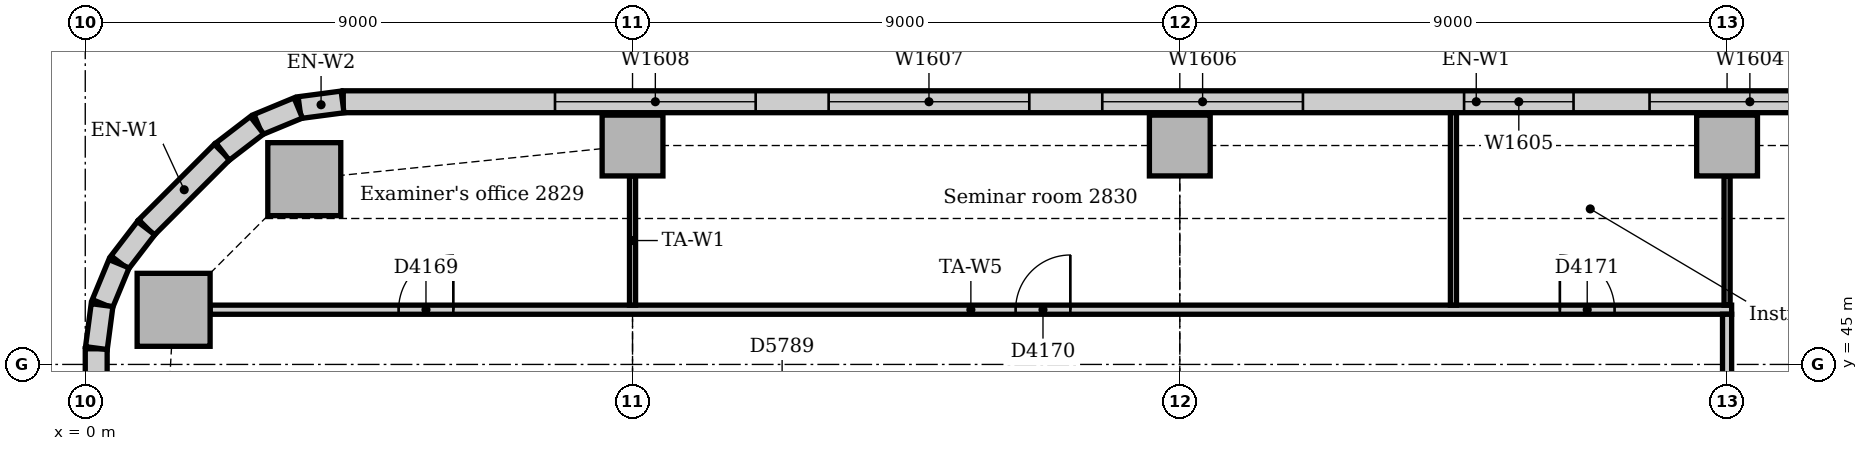
"""IFC4 building model, lengths in metres.
Left out: names, types, materials, properties, quantities, classifications, styles, units other than length and angle.
Written with IfcOpenShell. Run it as: python <this file> out.ifc"""

import sys

from ifc_helpers import new_model, si_unit, direction, frame, frame_2d, origin, origin_2d, place, context, subcontext, project, spatial, rectangle, extrude, element, fill, save


model = new_model("IFC4")
c1 = context("Model", 3, precision=1e-05, world=origin(), true_north=direction((0.0, 1.0)))
c2 = subcontext(c1, "Body", "Model", "MODEL_VIEW")
j1 = project(units=[si_unit("LENGTHUNIT", "METRE"), si_unit("PLANEANGLEUNIT", "RADIAN")], contexts=[c1])
p1 = place(None, origin())
s1 = spatial("IfcSite", under=j1, at=p1, CompositionType="ELEMENT")
p2 = place(p1, origin())
s2 = spatial("IfcBuilding", under=s1, at=p2, CompositionType="ELEMENT")
p3 = place(p2, frame((0.0, 0.0, 120.0)))
s3 = spatial("IfcBuildingStorey", under=s2, at=p3, CompositionType="ELEMENT", Elevation=120.0)
for number, where, z_axis, x_axis in (
    (1, (3.602, 48.047, 0.0), (0.0, 0.0, 1.0), (1.0, 0.0, 0.0)),
    (2, (1.453, 45.898, 0.0), (0.0, 0.0, 1.0), (1.0, 0.0, 0.0)),
):
    element("IfcColumn", number, at=place(p3, frame(where, z_axis=z_axis, x_axis=x_axis)), inside=s3, PredefinedType="COLUMN", context=c2, shape_type="SweptSolid", body=[
        extrude(rectangle(XDim=1.2, YDim=1.2, at=origin_2d()), origin(), (0.0, 0.0, 1.0), 3.85),
    ])
for number, where, z_axis, x_axis in (
    (3, (9.0, 48.6, 0.0), (0.0, 0.0, 1.0), (1.0, 0.0, 0.0)),
    (4, (18.0, 48.6, 0.0), (0.0, 0.0, 1.0), (1.0, 0.0, 0.0)),
    (5, (27.0, 48.6, 0.0), (0.0, 0.0, 1.0), (1.0, 0.0, 0.0)),
):
    element("IfcColumn", number, at=place(p3, frame(where, z_axis=z_axis, x_axis=x_axis)), inside=s3, PredefinedType="COLUMN", context=c2, shape_type="SweptSolid", body=[
        extrude(rectangle(XDim=1.0, YDim=1.0, at=origin_2d()), origin(), (0.0, 0.0, 1.0), 3.85),
    ])
p4 = place(p3, frame((41.507, 49.32, 0.0), z_axis=(0.0, 0.0, 1.0), x_axis=(-1.0, 0.0, 0.0)))
e6 = element("IfcWall", 6, at=p4, inside=s3, PredefinedType="STANDARD", context=c2, shape_type="SweptSolid", body=[
    extrude(rectangle(XDim=37.265, YDim=0.36, at=frame_2d((18.632, 0.0))), origin(), (0.0, 0.0, 1.0), 3.85),
])
p5 = place(p4, frame((3.482, 0.0, 0.9)))
e7 = element("IfcOpeningElement", 7, at=p5, cuts=e6, PredefinedType="OPENING", context=c2, shape_type="SweptSolid", body=[
    extrude(rectangle(XDim=3.3, YDim=1.6, at=frame_2d((1.65, 0.8))), frame((0.0, 0.19, 0.0), z_axis=(0.0, -1.0, 0.0), x_axis=(1.0, 0.0, 0.0)), (0.0, 0.0, 1.0), 0.38),
])
p6 = place(p4, frame((7.982, 0.0, 0.9)))
e8 = element("IfcOpeningElement", 8, at=p6, cuts=e6, PredefinedType="OPENING", context=c2, shape_type="SweptSolid", body=[
    extrude(rectangle(XDim=3.3, YDim=1.6, at=frame_2d((1.65, 0.8))), frame((0.0, 0.19, 0.0), z_axis=(0.0, -1.0, 0.0), x_axis=(1.0, 0.0, 0.0)), (0.0, 0.0, 1.0), 0.38),
])
p7 = place(p4, frame((12.482, 0.0, 0.9)))
e9 = element("IfcOpeningElement", 9, at=p7, cuts=e6, PredefinedType="OPENING", context=c2, shape_type="SweptSolid", body=[
    extrude(rectangle(XDim=3.3, YDim=1.6, at=frame_2d((1.65, 0.8))), frame((0.0, 0.19, 0.0), z_axis=(0.0, -1.0, 0.0), x_axis=(1.0, 0.0, 0.0)), (0.0, 0.0, 1.0), 0.38),
])
p8 = place(p4, frame((17.032, 0.0, 0.9)))
e10 = element("IfcOpeningElement", 10, at=p8, cuts=e6, PredefinedType="OPENING", context=c2, shape_type="SweptSolid", body=[
    extrude(rectangle(XDim=1.8, YDim=1.6, at=frame_2d((0.9, 0.8))), frame((0.0, 0.19, 0.0), z_axis=(0.0, -1.0, 0.0), x_axis=(1.0, 0.0, 0.0)), (0.0, 0.0, 1.0), 0.38),
])
p9 = place(p4, frame((21.482, 0.0, 0.9)))
e11 = element("IfcOpeningElement", 11, at=p9, cuts=e6, PredefinedType="OPENING", context=c2, shape_type="SweptSolid", body=[
    extrude(rectangle(XDim=3.3, YDim=1.6, at=frame_2d((1.65, 0.8))), frame((0.0, 0.19, 0.0), z_axis=(0.0, -1.0, 0.0), x_axis=(1.0, 0.0, 0.0)), (0.0, 0.0, 1.0), 0.38),
])
p10 = place(p4, frame((25.982, 0.0, 0.9)))
e12 = element("IfcOpeningElement", 12, at=p10, cuts=e6, PredefinedType="OPENING", context=c2, shape_type="SweptSolid", body=[
    extrude(rectangle(XDim=3.3, YDim=1.6, at=frame_2d((1.65, 0.8))), frame((0.0, 0.19, 0.0), z_axis=(0.0, -1.0, 0.0), x_axis=(1.0, 0.0, 0.0)), (0.0, 0.0, 1.0), 0.38),
])
p11 = place(p4, frame((30.482, 0.0, 0.9)))
e13 = element("IfcOpeningElement", 13, at=p11, cuts=e6, PredefinedType="OPENING", context=c2, shape_type="SweptSolid", body=[
    extrude(rectangle(XDim=3.3, YDim=1.6, at=frame_2d((1.65, 0.8))), frame((0.0, 0.19, 0.0), z_axis=(0.0, -1.0, 0.0), x_axis=(1.0, 0.0, 0.0)), (0.0, 0.0, 1.0), 0.38),
])
p12 = place(p3, frame((2.249, 48.494, 0.0), z_axis=(0.0, 0.0, 1.0), x_axis=(-0.707106781187, -0.707106781187, 0.0)))
e14 = element("IfcWall", 14, at=p12, inside=s3, PredefinedType="STANDARD", context=c2, shape_type="SweptSolid", body=[
    extrude(rectangle(XDim=1.757, YDim=0.36, at=frame_2d((0.879, 0.0))), origin(), (0.0, 0.0, 1.0), 3.85),
])
p13 = place(p3, frame((0.18, 45.257, 0.0), z_axis=(0.0, 0.0, 1.0), x_axis=(0.0, -1.0, 0.0)))
e15 = element("IfcWall", 15, at=p13, inside=s3, PredefinedType="STANDARD", context=c2, shape_type="SweptSolid", body=[
    extrude(rectangle(XDim=3.257, YDim=0.36, at=frame_2d((1.629, 0.0))), origin(), (0.0, 0.0, 1.0), 3.85),
])
for number, where, z_axis, x_axis in (
    (16, (4.231, 49.317, 0.0), (0.0, 0.0, 1.0), (-0.991, -0.131, 0.0)),
    (17, (3.503, 49.218, 0.0), (0.0, 0.0, 1.0), (-0.924, -0.383, 0.0)),
):
    element("IfcWall", number, at=place(p3, frame(where, z_axis=z_axis, x_axis=x_axis)), inside=s3, PredefinedType="STANDARD", context=c2, shape_type="SweptSolid", body=[
        extrude(rectangle(XDim=0.713, YDim=0.36, at=frame_2d((0.356, 0.0))), origin(), (0.0, 0.0, 1.0), 3.85),
    ])
for number, where, z_axis, x_axis in (
    (18, (2.825, 48.934, 0.0), (0.0, 0.0, 1.0), (-0.793, -0.609, 0.0)),
    (19, (1.0, 47.241, 0.0), (0.0, 0.0, 1.0), (-0.609, -0.793, 0.0)),
):
    element("IfcWall", number, at=place(p3, frame(where, z_axis=z_axis, x_axis=x_axis)), inside=s3, PredefinedType="STANDARD", context=c2, shape_type="SweptSolid", body=[
        extrude(rectangle(XDim=0.713, YDim=0.36, at=frame_2d((0.357, 0.0))), origin(), (0.0, 0.0, 1.0), 3.85),
    ])
for number, where, z_axis, x_axis in (
    (20, (0.555, 46.656, 0.0), (0.0, 0.0, 1.0), (-0.383, -0.924, 0.0)),
    (21, (0.276, 45.976, 0.0), (0.0, 0.0, 1.0), (-0.131, -0.991, 0.0)),
):
    element("IfcWall", number, at=place(p3, frame(where, z_axis=z_axis, x_axis=x_axis)), inside=s3, PredefinedType="STANDARD", context=c2, shape_type="SweptSolid", body=[
        extrude(rectangle(XDim=0.713, YDim=0.36, at=frame_2d((0.356, 0.0))), origin(), (0.0, 0.0, 1.0), 3.85),
    ])
p14 = place(p3, frame((2.053, 45.9, 0.0), z_axis=(0.0, 0.0, 1.0), x_axis=(1.0, 0.0, 0.0)))
e22 = element("IfcWall", 22, at=p14, inside=s3, PredefinedType="PARTITIONING", context=c2, shape_type="SweptSolid", body=[
    extrude(rectangle(XDim=25.022, YDim=0.15, at=frame_2d((12.511, 0.0))), origin(), (0.0, 0.0, 1.0), 3.85),
])
p15 = place(p14, frame((3.1, 0.0, 0.0)))
e23 = element("IfcOpeningElement", 23, at=p15, cuts=e22, PredefinedType="OPENING", context=c2, shape_type="SweptSolid", body=[
    extrude(rectangle(XDim=0.9, YDim=2.1, at=frame_2d((0.45, 1.05))), frame((0.0, 0.085, 0.0), z_axis=(0.0, -1.0, 0.0), x_axis=(1.0, 0.0, 0.0)), (0.0, 0.0, 1.0), 0.17),
])
p16 = place(p14, frame((13.247, 0.0, 0.0)))
e24 = element("IfcOpeningElement", 24, at=p16, cuts=e22, PredefinedType="OPENING", context=c2, shape_type="SweptSolid", body=[
    extrude(rectangle(XDim=0.9, YDim=2.1, at=frame_2d((0.45, 1.05))), frame((0.0, 0.085, 0.0), z_axis=(0.0, -1.0, 0.0), x_axis=(1.0, 0.0, 0.0)), (0.0, 0.0, 1.0), 0.17),
])
p17 = place(p14, frame((22.197, 0.0, 0.0)))
e25 = element("IfcOpeningElement", 25, at=p17, cuts=e22, PredefinedType="OPENING", context=c2, shape_type="SweptSolid", body=[
    extrude(rectangle(XDim=0.9, YDim=2.1, at=frame_2d((0.45, 1.05))), frame((0.0, 0.085, 0.0), z_axis=(0.0, -1.0, 0.0), x_axis=(1.0, 0.0, 0.0)), (0.0, 0.0, 1.0), 0.17),
])
p18 = place(p3, frame((27.0, 44.6, 0.0), z_axis=(0.0, 0.0, 1.0), x_axis=(0.0, 1.0, 0.0)))
e26 = element("IfcWall", 26, at=p18, inside=s3, PredefinedType="PARTITIONING", context=c2, shape_type="SweptSolid", body=[
    extrude(rectangle(XDim=1.225, YDim=0.15, at=frame_2d((0.613, 0.0))), origin(), (0.0, 0.0, 1.0), 3.652),
])
p19 = place(p3, frame((9.0, 45.975, 0.0), z_axis=(0.0, 0.0, 1.0), x_axis=(0.0, 1.0, 0.0)))
e27 = element("IfcWall", 27, at=p19, inside=s3, PredefinedType="PARTITIONING", context=c2, shape_type="SweptSolid", body=[
    extrude(rectangle(XDim=2.125, YDim=0.1, at=frame_2d((1.062, 0.0))), origin(), (0.0, 0.0, 1.0), 3.652),
])
p20 = place(p3, frame((22.5, 45.975, 0.0), z_axis=(0.0, 0.0, 1.0), x_axis=(0.0, 1.0, 0.0)))
e28 = element("IfcWall", 28, at=p20, inside=s3, PredefinedType="PARTITIONING", context=c2, shape_type="SweptSolid", body=[
    extrude(rectangle(XDim=3.165, YDim=0.1, at=frame_2d((1.583, 0.0))), origin(), (0.0, 0.0, 1.0), 3.85),
])
p21 = place(p3, frame((27.0, 45.975, 0.0), z_axis=(0.0, 0.0, 1.0), x_axis=(0.0, 1.0, 0.0)))
e29 = element("IfcWall", 29, at=p21, inside=s3, PredefinedType="PARTITIONING", context=c2, shape_type="SweptSolid", body=[
    extrude(rectangle(XDim=2.125, YDim=0.1, at=frame_2d((1.062, 0.0))), origin(), (0.0, 0.0, 1.0), 3.652),
])
p22 = place(p7, origin())
e30 = element("IfcWindow", 30, at=p22, inside=s3, PartitioningType="SINGLE_PANEL", PredefinedType="WINDOW", context=c2, shape_type="SweptSolid", body=[
    extrude(rectangle(XDim=3.3, YDim=1.6, at=frame_2d((1.65, 0.8))), frame((0.0, 0.13, 0.0), z_axis=(0.0, -1.0, 0.0), x_axis=(1.0, 0.0, 0.0)), (0.0, 0.0, 1.0), 0.06),
])
fill(e9, e30)
p23 = place(p8, origin())
e31 = element("IfcWindow", 31, at=p23, inside=s3, PartitioningType="SINGLE_PANEL", PredefinedType="WINDOW", context=c2, shape_type="SweptSolid", body=[
    extrude(rectangle(XDim=1.8, YDim=1.6, at=frame_2d((0.9, 0.8))), frame((0.0, 0.13, 0.0), z_axis=(0.0, -1.0, 0.0), x_axis=(1.0, 0.0, 0.0)), (0.0, 0.0, 1.0), 0.06),
])
fill(e10, e31)
p24 = place(p9, origin())
e32 = element("IfcWindow", 32, at=p24, inside=s3, PartitioningType="SINGLE_PANEL", PredefinedType="WINDOW", context=c2, shape_type="SweptSolid", body=[
    extrude(rectangle(XDim=3.3, YDim=1.6, at=frame_2d((1.65, 0.8))), frame((0.0, 0.13, 0.0), z_axis=(0.0, -1.0, 0.0), x_axis=(1.0, 0.0, 0.0)), (0.0, 0.0, 1.0), 0.06),
])
fill(e11, e32)
p25 = place(p10, origin())
e33 = element("IfcWindow", 33, at=p25, inside=s3, PartitioningType="SINGLE_PANEL", PredefinedType="WINDOW", context=c2, shape_type="SweptSolid", body=[
    extrude(rectangle(XDim=3.3, YDim=1.6, at=frame_2d((1.65, 0.8))), frame((0.0, 0.13, 0.0), z_axis=(0.0, -1.0, 0.0), x_axis=(1.0, 0.0, 0.0)), (0.0, 0.0, 1.0), 0.06),
])
fill(e12, e33)
p26 = place(p11, origin())
e34 = element("IfcWindow", 34, at=p26, inside=s3, PartitioningType="SINGLE_PANEL", PredefinedType="WINDOW", context=c2, shape_type="SweptSolid", body=[
    extrude(rectangle(XDim=3.3, YDim=1.6, at=frame_2d((1.65, 0.8))), frame((0.0, 0.13, 0.0), z_axis=(0.0, -1.0, 0.0), x_axis=(1.0, 0.0, 0.0)), (0.0, 0.0, 1.0), 0.06),
])
fill(e13, e34)
p27 = place(p15, origin())
e35 = element("IfcDoor", 35, at=p27, inside=s3, OperationType="SINGLE_SWING_RIGHT", PredefinedType="DOOR", context=c2, shape_type="SweptSolid", body=[
    extrude(rectangle(XDim=0.9, YDim=2.1, at=frame_2d((0.45, 1.05))), frame((0.0, 0.025, 0.0), z_axis=(0.0, -1.0, 0.0), x_axis=(1.0, 0.0, 0.0)), (0.0, 0.0, 1.0), 0.05),
])
fill(e23, e35)
p28 = place(p16, origin())
e36 = element("IfcDoor", 36, at=p28, inside=s3, OperationType="SINGLE_SWING_RIGHT", PredefinedType="DOOR", context=c2, shape_type="SweptSolid", body=[
    extrude(rectangle(XDim=0.9, YDim=2.1, at=frame_2d((0.45, 1.05))), frame((0.0, 0.025, 0.0), z_axis=(0.0, -1.0, 0.0), x_axis=(1.0, 0.0, 0.0)), (0.0, 0.0, 1.0), 0.05),
])
fill(e24, e36)
p29 = place(p17, origin())
e37 = element("IfcDoor", 37, at=p29, inside=s3, OperationType="SINGLE_SWING_LEFT", PredefinedType="DOOR", context=c2, shape_type="SweptSolid", body=[
    extrude(rectangle(XDim=0.9, YDim=2.1, at=frame_2d((0.45, 1.05))), frame((0.0, 0.025, 0.0), z_axis=(0.0, -1.0, 0.0), x_axis=(1.0, 0.0, 0.0)), (0.0, 0.0, 1.0), 0.05),
])
fill(e25, e37)
save(model, sys.argv[1])
